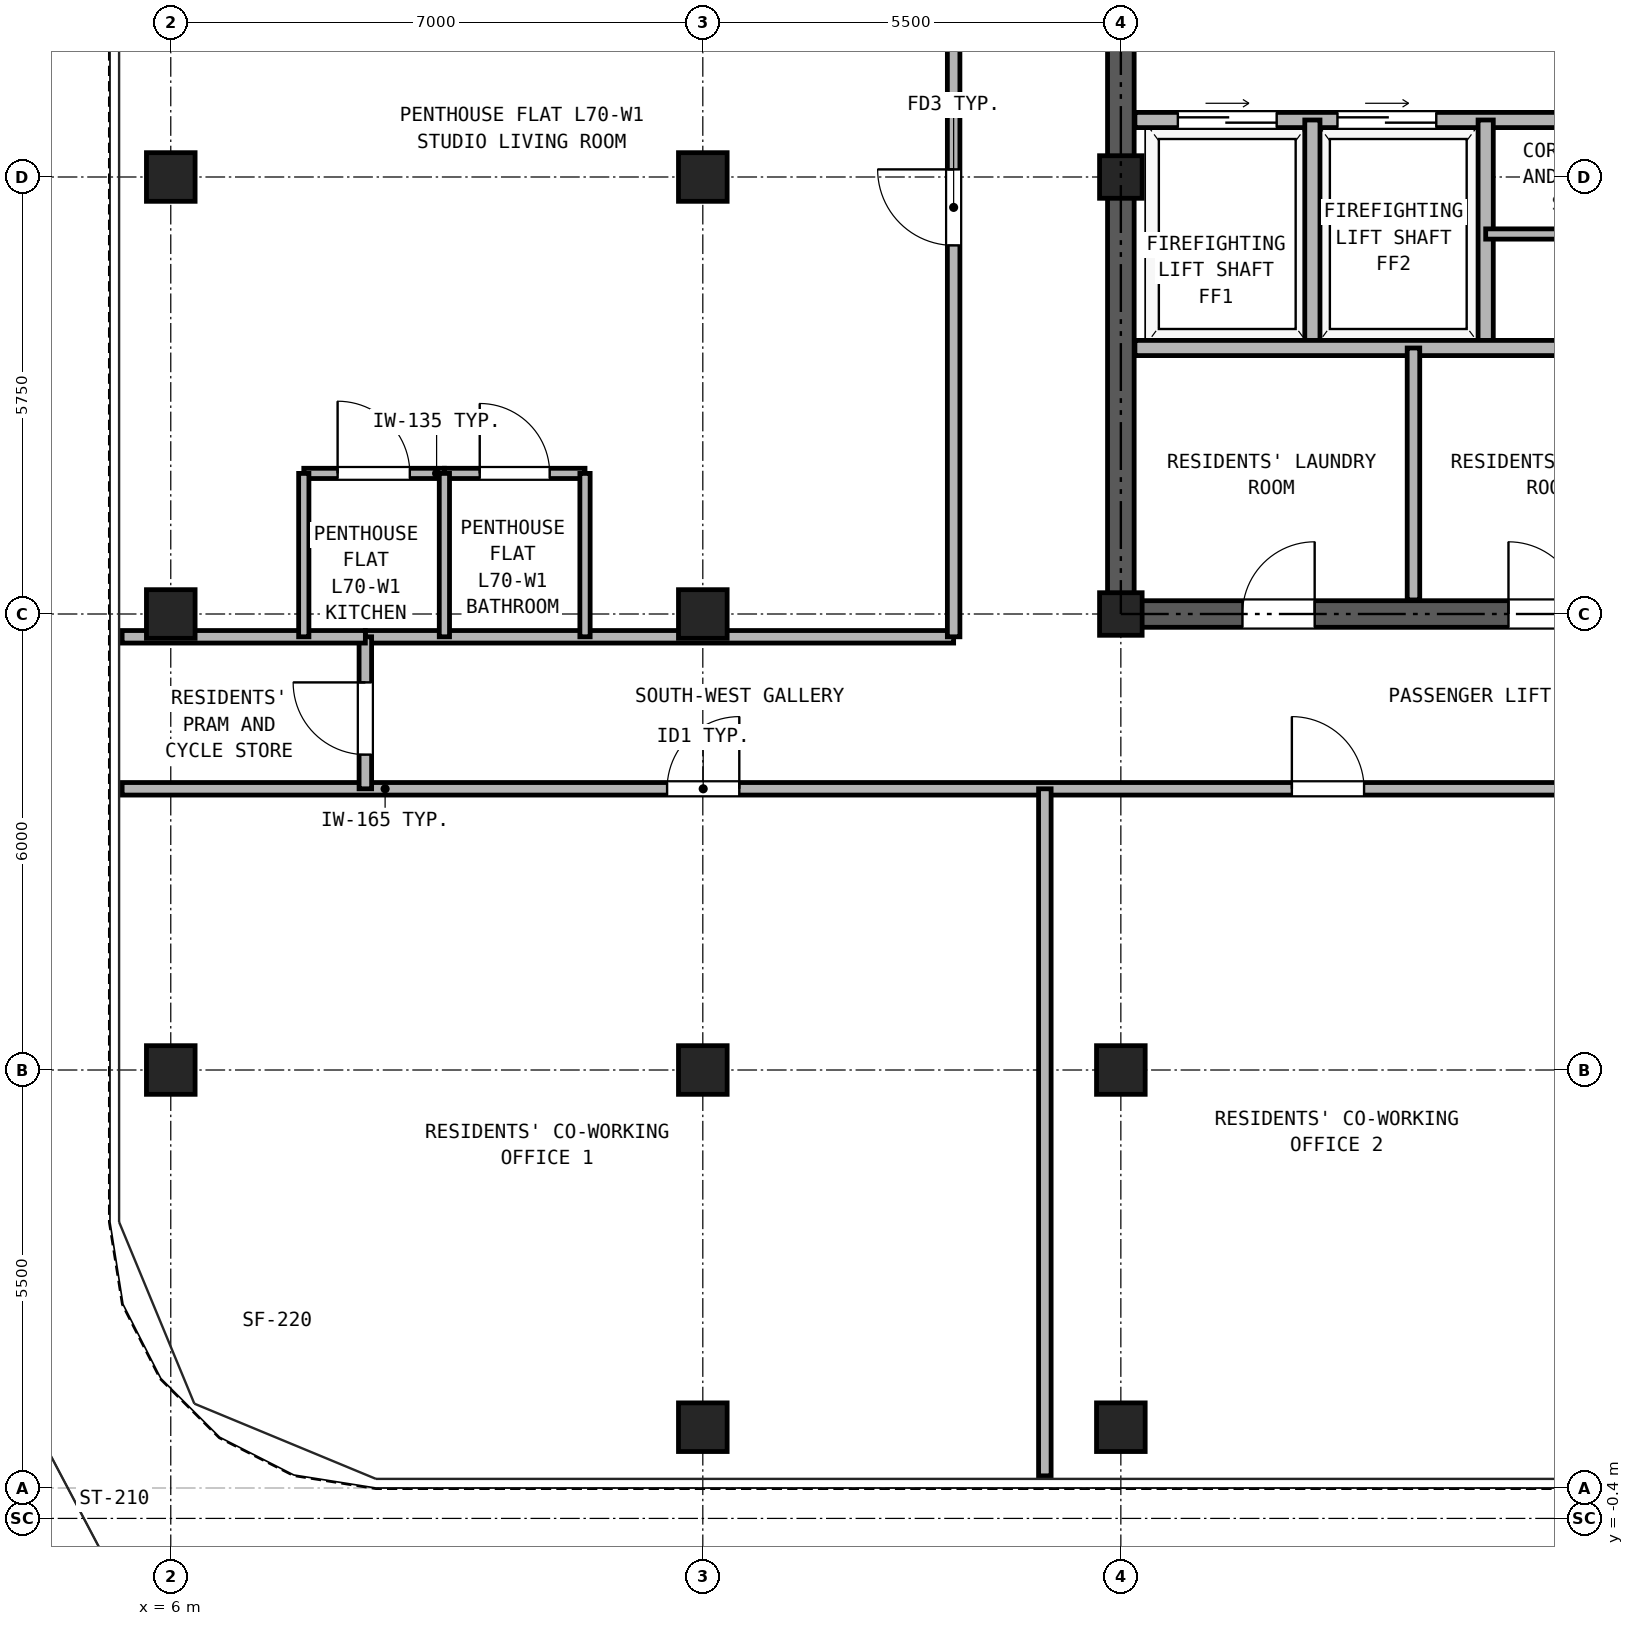
"""IFC4 building model, lengths in metres.
Left out: names, types, materials, properties, quantities, classifications, styles, units other than length and angle.
Written with IfcOpenShell. Run it as: python <this file> out.ifc"""

import sys

from ifc_helpers import new_model, si_unit, direction, frame, frame_2d, origin, origin_2d, place, context, subcontext, project, spatial, rectangle, hollow_rectangle, extrude, source, transform, mapped, element, fill, save


model = new_model("IFC4")
c1 = context("Model", 3, precision=1e-05, world=origin(), true_north=direction((0.0, 1.0)))
c2 = subcontext(c1, "Body", "Model", "MODEL_VIEW")
j1 = project(units=[si_unit("LENGTHUNIT", "METRE"), si_unit("PLANEANGLEUNIT", "RADIAN")], contexts=[c1])
p1 = place(None, origin())
s1 = spatial("IfcSite", under=j1, at=p1, CompositionType="ELEMENT")
p2 = place(p1, origin())
s2 = spatial("IfcBuilding", under=s1, at=p2, CompositionType="ELEMENT")
p3 = place(p2, frame((0.0, 0.0, 245.7)))
s3 = spatial("IfcBuildingStorey", under=s2, at=p3, CompositionType="ELEMENT", Elevation=245.7)
m1 = source(origin(), c2, "Body", "SweptSolid", [
    extrude(hollow_rectangle(XDim=0.64, YDim=0.64, WallThickness=0.035, at=origin_2d()), origin(), (0.0, 0.0, 1.0), 2.98),
])
for number, where, z_axis, x_axis in (
    (1, (13.0, 0.8, 0.0), (0.0, 0.0, 1.0), (1.0, 0.0, 0.0)),
    (2, (18.5, 0.8, 0.0), (0.0, 0.0, 1.0), (1.0, 0.0, 0.0)),
    (3, (6.0, 5.5, 0.0), (0.0, 0.0, 1.0), (1.0, 0.0, 0.0)),
    (4, (6.0, 11.5, 0.0), (0.0, 0.0, 1.0), (1.0, 0.0, 0.0)),
    (5, (6.0, 17.25, 0.0), (0.0, 0.0, 1.0), (1.0, 0.0, 0.0)),
    (6, (13.0, 5.5, 0.0), (0.0, 0.0, 1.0), (1.0, 0.0, 0.0)),
    (7, (13.0, 11.5, 0.0), (0.0, 0.0, 1.0), (1.0, 0.0, 0.0)),
    (8, (13.0, 17.25, 0.0), (0.0, 0.0, 1.0), (1.0, 0.0, 0.0)),
    (9, (18.5, 5.5, 0.0), (0.0, 0.0, 1.0), (1.0, 0.0, 0.0)),
):
    element("IfcColumn", number, at=place(p3, frame(where, z_axis=z_axis, x_axis=x_axis)), inside=s3, PredefinedType="COLUMN", context=c2, shape_type="MappedRepresentation", body=[
        mapped(m1, transform((0.0, 0.0, 0.0), x_axis=(1.0, 0.0, 0.0), y_axis=(0.0, 1.0, 0.0), z_axis=(0.0, 0.0, 1.0), scale=1.0)),
    ])
m2 = source(origin(), c2, "Body", "SweptSolid", [
    extrude(hollow_rectangle(XDim=0.56, YDim=0.56, WallThickness=0.03, at=origin_2d()), origin(), (0.0, 0.0, 1.0), 2.98),
])
for number, where, z_axis, x_axis in (
    (10, (18.5, 11.5, 0.0), (0.0, 0.0, 1.0), (1.0, 0.0, 0.0)),
    (11, (18.5, 17.25, 0.0), (0.0, 0.0, 1.0), (1.0, 0.0, 0.0)),
):
    element("IfcColumn", number, at=place(p3, frame(where, z_axis=z_axis, x_axis=x_axis)), inside=s3, PredefinedType="COLUMN", context=c2, shape_type="MappedRepresentation", body=[
        mapped(m2, transform((0.0, 0.0, 0.0), x_axis=(1.0, 0.0, 0.0), y_axis=(0.0, 1.0, 0.0), z_axis=(0.0, 0.0, 1.0), scale=1.0)),
    ])
p4 = place(p3, frame((18.325, 11.5, 0.0), z_axis=(0.0, 0.0, 1.0), x_axis=(1.0, 0.0, 0.0)))
e12 = element("IfcWall", 12, at=p4, inside=s3, PredefinedType="SHEAR", context=c2, shape_type="SweptSolid", body=[
    extrude(rectangle(XDim=10.35, YDim=0.35, at=frame_2d((5.175, 0.0))), origin(), (0.0, 0.0, 1.0), 2.98),
])
p5 = place(p4, frame((1.775, 0.0, 0.0)))
e13 = element("IfcOpeningElement", 13, at=p5, cuts=e12, PredefinedType="OPENING", context=c2, shape_type="SweptSolid", body=[
    extrude(rectangle(XDim=0.95, YDim=2.15, at=frame_2d((0.475, 1.075))), frame((0.0, 0.185, 0.0), z_axis=(0.0, -1.0, 0.0), x_axis=(1.0, 0.0, 0.0)), (0.0, 0.0, 1.0), 0.37),
])
p6 = place(p4, frame((5.275, 0.0, 0.0)))
e14 = element("IfcOpeningElement", 14, at=p6, cuts=e12, PredefinedType="OPENING", context=c2, shape_type="SweptSolid", body=[
    extrude(rectangle(XDim=0.95, YDim=2.15, at=frame_2d((0.475, 1.075))), frame((0.0, 0.185, 0.0), z_axis=(0.0, -1.0, 0.0), x_axis=(1.0, 0.0, 0.0)), (0.0, 0.0, 1.0), 0.37),
])
p7 = place(p4, frame((8.175, 0.0, 0.0)))
e15 = element("IfcOpeningElement", 15, at=p7, cuts=e12, PredefinedType="OPENING", context=c2, shape_type="SweptSolid", body=[
    extrude(rectangle(XDim=1.1, YDim=2.25, at=frame_2d((0.55, 1.125))), frame((0.0, 0.185, 0.0), z_axis=(0.0, -1.0, 0.0), x_axis=(1.0, 0.0, 0.0)), (0.0, 0.0, 1.0), 0.37),
])
p8 = place(p3, frame((18.5, 11.675, 0.0), z_axis=(0.0, 0.0, 1.0), x_axis=(0.0, 1.0, 0.0)))
e16 = element("IfcWall", 16, at=p8, inside=s3, PredefinedType="SHEAR", context=c2, shape_type="SweptSolid", body=[
    extrude(rectangle(XDim=16.9, YDim=0.35, at=frame_2d((8.45, 0.0))), origin(), (0.0, 0.0, 1.0), 2.98),
])
p9 = place(p8, frame((7.475, 0.0, 0.0)))
e17 = element("IfcOpeningElement", 17, at=p9, cuts=e16, PredefinedType="OPENING", context=c2, shape_type="SweptSolid", body=[
    extrude(rectangle(XDim=1.15, YDim=2.2, at=frame_2d((0.575, 1.1))), frame((0.0, 0.185, 0.0), z_axis=(0.0, -1.0, 0.0), x_axis=(1.0, 0.0, 0.0)), (0.0, 0.0, 1.0), 0.37),
])
p10 = place(p3, frame((18.685, 18.0, 0.0), z_axis=(0.0, 0.0, 1.0), x_axis=(1.0, 0.0, 0.0)))
e18 = element("IfcWall", 18, at=p10, inside=s3, PredefinedType="PARTITIONING", context=c2, shape_type="SweptSolid", body=[
    extrude(rectangle(XDim=9.63, YDim=0.2, at=frame_2d((4.815, 0.0))), origin(), (0.0, 0.0, 1.0), 2.98),
])
p11 = place(p10, frame((0.565, 0.0, 0.0)))
e19 = element("IfcOpeningElement", 19, at=p11, cuts=e18, PredefinedType="OPENING", context=c2, shape_type="SweptSolid", body=[
    extrude(rectangle(XDim=1.3, YDim=2.3, at=frame_2d((0.65, 1.15))), frame((0.0, 0.11, 0.0), z_axis=(0.0, -1.0, 0.0), x_axis=(1.0, 0.0, 0.0)), (0.0, 0.0, 1.0), 0.22),
])
p12 = place(p10, frame((2.665, 0.0, 0.0)))
e20 = element("IfcOpeningElement", 20, at=p12, cuts=e18, PredefinedType="OPENING", context=c2, shape_type="SweptSolid", body=[
    extrude(rectangle(XDim=1.3, YDim=2.3, at=frame_2d((0.65, 1.15))), frame((0.0, 0.11, 0.0), z_axis=(0.0, -1.0, 0.0), x_axis=(1.0, 0.0, 0.0)), (0.0, 0.0, 1.0), 0.22),
])
p13 = place(p10, frame((7.165, 0.0, 0.0)))
e21 = element("IfcOpeningElement", 21, at=p13, cuts=e18, PredefinedType="OPENING", context=c2, shape_type="SweptSolid", body=[
    extrude(rectangle(XDim=1.0, YDim=2.15, at=frame_2d((0.5, 1.075))), frame((0.0, 0.11, 0.0), z_axis=(0.0, -1.0, 0.0), x_axis=(1.0, 0.0, 0.0)), (0.0, 0.0, 1.0), 0.22),
])
for number, where, z_axis, x_axis in (
    (22, (21.02, 15.0, 0.0), (0.0, 0.0, 1.0), (0.0, 1.0, 0.0)),
    (23, (23.3, 15.0, 0.0), (0.0, 0.0, 1.0), (0.0, 1.0, 0.0)),
):
    element("IfcWall", number, at=place(p3, frame(where, z_axis=z_axis, x_axis=x_axis)), inside=s3, PredefinedType="PARTITIONING", context=c2, shape_type="SweptSolid", body=[
        extrude(rectangle(XDim=3.0, YDim=0.2, at=frame_2d((1.5, 0.0))), origin(), (0.0, 0.0, 1.0), 2.98),
    ])
p14 = place(p3, frame((18.685, 15.0, 0.0), z_axis=(0.0, 0.0, 1.0), x_axis=(1.0, 0.0, 0.0)))
e24 = element("IfcWall", 24, at=p14, inside=s3, PredefinedType="PARTITIONING", context=c2, shape_type="SweptSolid", body=[
    extrude(rectangle(XDim=9.63, YDim=0.2, at=frame_2d((4.815, 0.0))), origin(), (0.0, 0.0, 1.0), 2.98),
])
p15 = place(p3, frame((23.3, 16.5, 0.0), z_axis=(0.0, 0.0, 1.0), x_axis=(1.0, 0.0, 0.0)))
e25 = element("IfcWall", 25, at=p15, inside=s3, PredefinedType="PARTITIONING", context=c2, shape_type="SweptSolid", body=[
    extrude(rectangle(XDim=5.015, YDim=0.135, at=frame_2d((2.507, 0.0))), origin(), (0.0, 0.0, 1.0), 2.98),
])
p16 = place(p15, frame((2.55, 0.0, 0.0)))
e26 = element("IfcOpeningElement", 26, at=p16, cuts=e25, PredefinedType="OPENING", context=c2, shape_type="SweptSolid", body=[
    extrude(rectangle(XDim=0.9, YDim=2.05, at=frame_2d((0.45, 1.025))), frame((0.0, 0.077, 0.0), z_axis=(0.0, -1.0, 0.0), x_axis=(1.0, 0.0, 0.0)), (0.0, 0.0, 1.0), 0.155),
])
p17 = place(p3, frame((22.35, 11.685, 0.0), z_axis=(0.0, 0.0, 1.0), x_axis=(0.0, 1.0, 0.0)))
e27 = element("IfcWall", 27, at=p17, inside=s3, PredefinedType="PARTITIONING", context=c2, shape_type="SweptSolid", body=[
    extrude(rectangle(XDim=3.315, YDim=0.165, at=frame_2d((1.657, 0.0))), origin(), (0.0, 0.0, 1.0), 2.98),
])
p18 = place(p3, frame((5.36, 9.2, 0.0), z_axis=(0.0, 0.0, 1.0), x_axis=(1.0, 0.0, 0.0)))
e28 = element("IfcWall", 28, at=p18, inside=s3, PredefinedType="PARTITIONING", context=c2, shape_type="SweptSolid", body=[
    extrude(rectangle(XDim=36.28, YDim=0.165, at=frame_2d((18.14, 0.0))), origin(), (0.0, 0.0, 1.0), 2.98),
])
p19 = place(p18, frame((7.17, 0.0, 0.0)))
e29 = element("IfcOpeningElement", 29, at=p19, cuts=e28, PredefinedType="OPENING", context=c2, shape_type="SweptSolid", body=[
    extrude(rectangle(XDim=0.95, YDim=2.15, at=frame_2d((0.475, 1.075))), frame((0.0, 0.093, 0.0), z_axis=(0.0, -1.0, 0.0), x_axis=(1.0, 0.0, 0.0)), (0.0, 0.0, 1.0), 0.185),
])
p20 = place(p18, frame((15.39, 0.0, 0.0)))
e30 = element("IfcOpeningElement", 30, at=p20, cuts=e28, PredefinedType="OPENING", context=c2, shape_type="SweptSolid", body=[
    extrude(rectangle(XDim=0.95, YDim=2.15, at=frame_2d((0.475, 1.075))), frame((0.0, 0.093, 0.0), z_axis=(0.0, -1.0, 0.0), x_axis=(1.0, 0.0, 0.0)), (0.0, 0.0, 1.0), 0.185),
])
p21 = place(p18, frame((22.39, 0.0, 0.0)))
e31 = element("IfcOpeningElement", 31, at=p21, cuts=e28, PredefinedType="OPENING", context=c2, shape_type="SweptSolid", body=[
    extrude(rectangle(XDim=0.95, YDim=2.15, at=frame_2d((0.475, 1.075))), frame((0.0, 0.093, 0.0), z_axis=(0.0, -1.0, 0.0), x_axis=(1.0, 0.0, 0.0)), (0.0, 0.0, 1.0), 0.185),
])
p22 = place(p18, frame((28.99, 0.0, 0.0)))
e32 = element("IfcOpeningElement", 32, at=p22, cuts=e28, PredefinedType="OPENING", context=c2, shape_type="SweptSolid", body=[
    extrude(rectangle(XDim=0.95, YDim=2.15, at=frame_2d((0.475, 1.075))), frame((0.0, 0.093, 0.0), z_axis=(0.0, -1.0, 0.0), x_axis=(1.0, 0.0, 0.0)), (0.0, 0.0, 1.0), 0.185),
])
p23 = place(p3, frame((8.56, 11.2, 0.0), z_axis=(0.0, 0.0, 1.0), x_axis=(1.0, 0.0, 0.0)))
e33 = element("IfcWall", 33, at=p23, inside=s3, PredefinedType="PARTITIONING", context=c2, shape_type="SweptSolid", body=[
    extrude(rectangle(XDim=7.74, YDim=0.165, at=frame_2d((3.87, 0.0))), origin(), (0.0, 0.0, 1.0), 2.98),
])
p24 = place(p3, frame((8.56, 9.2, 0.0), z_axis=(0.0, 0.0, 1.0), x_axis=(0.0, 1.0, 0.0)))
e34 = element("IfcWall", 34, at=p24, inside=s3, PredefinedType="PARTITIONING", context=c2, shape_type="SweptSolid", body=[
    extrude(rectangle(XDim=2.0, YDim=0.165, at=frame_2d((1.0, 0.0))), origin(), (0.0, 0.0, 1.0), 2.98),
])
p25 = place(p24, frame((0.45, 0.0, 0.0)))
e35 = element("IfcOpeningElement", 35, at=p25, cuts=e34, PredefinedType="OPENING", context=c2, shape_type="SweptSolid", body=[
    extrude(rectangle(XDim=0.95, YDim=2.15, at=frame_2d((0.475, 1.075))), frame((0.0, 0.093, 0.0), z_axis=(0.0, -1.0, 0.0), x_axis=(1.0, 0.0, 0.0)), (0.0, 0.0, 1.0), 0.185),
])
p26 = place(p3, frame((16.3, 11.2, 0.0), z_axis=(0.0, 0.0, 1.0), x_axis=(0.0, 1.0, 0.0)))
e36 = element("IfcWall", 36, at=p26, inside=s3, PredefinedType="PARTITIONING", context=c2, shape_type="SweptSolid", body=[
    extrude(rectangle(XDim=23.94, YDim=0.165, at=frame_2d((11.97, 0.0))), origin(), (0.0, 0.0, 1.0), 2.98),
])
p27 = place(p26, frame((5.15, 0.0, 0.0)))
e37 = element("IfcOpeningElement", 37, at=p27, cuts=e36, PredefinedType="OPENING", context=c2, shape_type="SweptSolid", body=[
    extrude(rectangle(XDim=1.0, YDim=2.15, at=frame_2d((0.5, 1.075))), frame((0.0, 0.093, 0.0), z_axis=(0.0, -1.0, 0.0), x_axis=(1.0, 0.0, 0.0)), (0.0, 0.0, 1.0), 0.185),
])
p28 = place(p26, frame((14.7, 0.0, 0.0)))
e38 = element("IfcOpeningElement", 38, at=p28, cuts=e36, PredefinedType="OPENING", context=c2, shape_type="SweptSolid", body=[
    extrude(rectangle(XDim=1.0, YDim=2.15, at=frame_2d((0.5, 1.075))), frame((0.0, 0.093, 0.0), z_axis=(0.0, -1.0, 0.0), x_axis=(1.0, 0.0, 0.0)), (0.0, 0.0, 1.0), 0.185),
])
p29 = place(p3, frame((17.5, 0.16, 0.0), z_axis=(0.0, 0.0, 1.0), x_axis=(0.0, 1.0, 0.0)))
e39 = element("IfcWall", 39, at=p29, inside=s3, PredefinedType="PARTITIONING", context=c2, shape_type="SweptSolid", body=[
    extrude(rectangle(XDim=9.04, YDim=0.165, at=frame_2d((4.52, 0.0))), origin(), (0.0, 0.0, 1.0), 2.98),
])
p30 = place(p3, frame((5.36, 11.2, 0.0), z_axis=(0.0, 0.0, 1.0), x_axis=(1.0, 0.0, 0.0)))
e40 = element("IfcWall", 40, at=p30, inside=s3, PredefinedType="PARTITIONING", context=c2, shape_type="SweptSolid", body=[
    extrude(rectangle(XDim=3.2, YDim=0.165, at=frame_2d((1.6, 0.0))), origin(), (0.0, 0.0, 1.0), 2.98),
])
p31 = place(p3, frame((7.75, 13.35, 0.0), z_axis=(0.0, 0.0, 1.0), x_axis=(1.0, 0.0, 0.0)))
e41 = element("IfcWall", 41, at=p31, inside=s3, PredefinedType="PARTITIONING", context=c2, shape_type="SweptSolid", body=[
    extrude(rectangle(XDim=1.85, YDim=0.135, at=frame_2d((0.925, 0.0))), origin(), (0.0, 0.0, 1.0), 2.98),
])
p32 = place(p31, frame((0.445, 0.0, 0.0)))
e42 = element("IfcOpeningElement", 42, at=p32, cuts=e41, PredefinedType="OPENING", context=c2, shape_type="SweptSolid", body=[
    extrude(rectangle(XDim=0.95, YDim=2.15, at=frame_2d((0.475, 1.075))), frame((0.0, 0.077, 0.0), z_axis=(0.0, -1.0, 0.0), x_axis=(1.0, 0.0, 0.0)), (0.0, 0.0, 1.0), 0.155),
])
p33 = place(p3, frame((9.6, 13.35, 0.0), z_axis=(0.0, 0.0, 1.0), x_axis=(1.0, 0.0, 0.0)))
e43 = element("IfcWall", 43, at=p33, inside=s3, PredefinedType="PARTITIONING", context=c2, shape_type="SweptSolid", body=[
    extrude(rectangle(XDim=1.85, YDim=0.135, at=frame_2d((0.925, 0.0))), origin(), (0.0, 0.0, 1.0), 2.98),
])
p34 = place(p33, frame((0.465, 0.0, 0.0)))
e44 = element("IfcOpeningElement", 44, at=p34, cuts=e43, PredefinedType="OPENING", context=c2, shape_type="SweptSolid", body=[
    extrude(rectangle(XDim=0.92, YDim=2.1, at=frame_2d((0.46, 1.05))), frame((0.0, 0.077, 0.0), z_axis=(0.0, -1.0, 0.0), x_axis=(1.0, 0.0, 0.0)), (0.0, 0.0, 1.0), 0.155),
])
for number, where, z_axis, x_axis in (
    (45, (7.75, 11.2, 0.0), (0.0, 0.0, 1.0), (0.0, 1.0, 0.0)),
    (46, (9.6, 11.2, 0.0), (0.0, 0.0, 1.0), (0.0, 1.0, 0.0)),
    (47, (11.45, 11.2, 0.0), (0.0, 0.0, 1.0), (0.0, 1.0, 0.0)),
):
    element("IfcWall", number, at=place(p3, frame(where, z_axis=z_axis, x_axis=x_axis)), inside=s3, PredefinedType="PARTITIONING", context=c2, shape_type="SweptSolid", body=[
        extrude(rectangle(XDim=2.15, YDim=0.135, at=frame_2d((1.075, 0.0))), origin(), (0.0, 0.0, 1.0), 2.98),
    ])
p35 = place(p11, origin())
e48 = element("IfcDoor", 48, at=p35, inside=s3, OperationType="DOUBLE_DOOR_SLIDING", PredefinedType="DOOR", context=c2, shape_type="SweptSolid", body=[
    extrude(rectangle(XDim=1.3, YDim=2.3, at=frame_2d((0.65, 1.15))), frame((0.0, 0.025, 0.0), z_axis=(0.0, -1.0, 0.0), x_axis=(1.0, 0.0, 0.0)), (0.0, 0.0, 1.0), 0.05),
])
fill(e19, e48)
p36 = place(p12, origin())
e49 = element("IfcDoor", 49, at=p36, inside=s3, OperationType="DOUBLE_DOOR_SLIDING", PredefinedType="DOOR", context=c2, shape_type="SweptSolid", body=[
    extrude(rectangle(XDim=1.3, YDim=2.3, at=frame_2d((0.65, 1.15))), frame((0.0, 0.025, 0.0), z_axis=(0.0, -1.0, 0.0), x_axis=(1.0, 0.0, 0.0)), (0.0, 0.0, 1.0), 0.05),
])
fill(e20, e49)
p37 = place(p5, frame((0.95, 0.0, 0.0), z_axis=(0.0, 0.0, 1.0), x_axis=(-1.0, 0.0, 0.0)))
e50 = element("IfcDoor", 50, at=p37, inside=s3, OperationType="SINGLE_SWING_RIGHT", PredefinedType="DOOR", context=c2, shape_type="SweptSolid", body=[
    extrude(rectangle(XDim=0.95, YDim=2.15, at=frame_2d((0.475, 1.075))), frame((0.0, 0.025, 0.0), z_axis=(0.0, -1.0, 0.0), x_axis=(1.0, 0.0, 0.0)), (0.0, 0.0, 1.0), 0.05),
])
fill(e13, e50)
p38 = place(p6, frame((0.95, 0.0, 0.0), z_axis=(0.0, 0.0, 1.0), x_axis=(-1.0, 0.0, 0.0)))
e51 = element("IfcDoor", 51, at=p38, inside=s3, OperationType="SINGLE_SWING_LEFT", PredefinedType="DOOR", context=c2, shape_type="SweptSolid", body=[
    extrude(rectangle(XDim=0.95, YDim=2.15, at=frame_2d((0.475, 1.075))), frame((0.0, 0.025, 0.0), z_axis=(0.0, -1.0, 0.0), x_axis=(1.0, 0.0, 0.0)), (0.0, 0.0, 1.0), 0.05),
])
fill(e14, e51)
p39 = place(p19, frame((0.95, 0.0, 0.0), z_axis=(0.0, 0.0, 1.0), x_axis=(-1.0, 0.0, 0.0)))
e52 = element("IfcDoor", 52, at=p39, inside=s3, OperationType="SINGLE_SWING_RIGHT", PredefinedType="DOOR", context=c2, shape_type="SweptSolid", body=[
    extrude(rectangle(XDim=0.95, YDim=2.15, at=frame_2d((0.475, 1.075))), frame((0.0, 0.025, 0.0), z_axis=(0.0, -1.0, 0.0), x_axis=(1.0, 0.0, 0.0)), (0.0, 0.0, 1.0), 0.05),
])
fill(e29, e52)
p40 = place(p20, frame((0.95, 0.0, 0.0), z_axis=(0.0, 0.0, 1.0), x_axis=(-1.0, 0.0, 0.0)))
e53 = element("IfcDoor", 53, at=p40, inside=s3, OperationType="SINGLE_SWING_LEFT", PredefinedType="DOOR", context=c2, shape_type="SweptSolid", body=[
    extrude(rectangle(XDim=0.95, YDim=2.15, at=frame_2d((0.475, 1.075))), frame((0.0, 0.025, 0.0), z_axis=(0.0, -1.0, 0.0), x_axis=(1.0, 0.0, 0.0)), (0.0, 0.0, 1.0), 0.05),
])
fill(e30, e53)
p41 = place(p25, frame((0.95, 0.0, 0.0), z_axis=(0.0, 0.0, 1.0), x_axis=(-1.0, 0.0, 0.0)))
e54 = element("IfcDoor", 54, at=p41, inside=s3, OperationType="SINGLE_SWING_RIGHT", PredefinedType="DOOR", context=c2, shape_type="SweptSolid", body=[
    extrude(rectangle(XDim=0.95, YDim=2.15, at=frame_2d((0.475, 1.075))), frame((0.0, 0.025, 0.0), z_axis=(0.0, -1.0, 0.0), x_axis=(1.0, 0.0, 0.0)), (0.0, 0.0, 1.0), 0.05),
])
fill(e35, e54)
p42 = place(p32, origin())
e55 = element("IfcDoor", 55, at=p42, inside=s3, OperationType="SINGLE_SWING_LEFT", PredefinedType="DOOR", context=c2, shape_type="SweptSolid", body=[
    extrude(rectangle(XDim=0.95, YDim=2.15, at=frame_2d((0.475, 1.075))), frame((0.0, 0.025, 0.0), z_axis=(0.0, -1.0, 0.0), x_axis=(1.0, 0.0, 0.0)), (0.0, 0.0, 1.0), 0.05),
])
fill(e42, e55)
p43 = place(p34, origin())
e56 = element("IfcDoor", 56, at=p43, inside=s3, OperationType="SINGLE_SWING_LEFT", PredefinedType="DOOR", context=c2, shape_type="SweptSolid", body=[
    extrude(rectangle(XDim=0.92, YDim=2.1, at=frame_2d((0.46, 1.05))), frame((0.0, 0.025, 0.0), z_axis=(0.0, -1.0, 0.0), x_axis=(1.0, 0.0, 0.0)), (0.0, 0.0, 1.0), 0.05),
])
fill(e44, e56)
p44 = place(p27, origin())
e57 = element("IfcDoor", 57, at=p44, inside=s3, OperationType="SINGLE_SWING_RIGHT", PredefinedType="DOOR", context=c2, shape_type="SweptSolid", body=[
    extrude(rectangle(XDim=1.0, YDim=2.15, at=frame_2d((0.5, 1.075))), frame((0.0, 0.025, 0.0), z_axis=(0.0, -1.0, 0.0), x_axis=(1.0, 0.0, 0.0)), (0.0, 0.0, 1.0), 0.05),
])
fill(e37, e57)
save(model, sys.argv[1])
